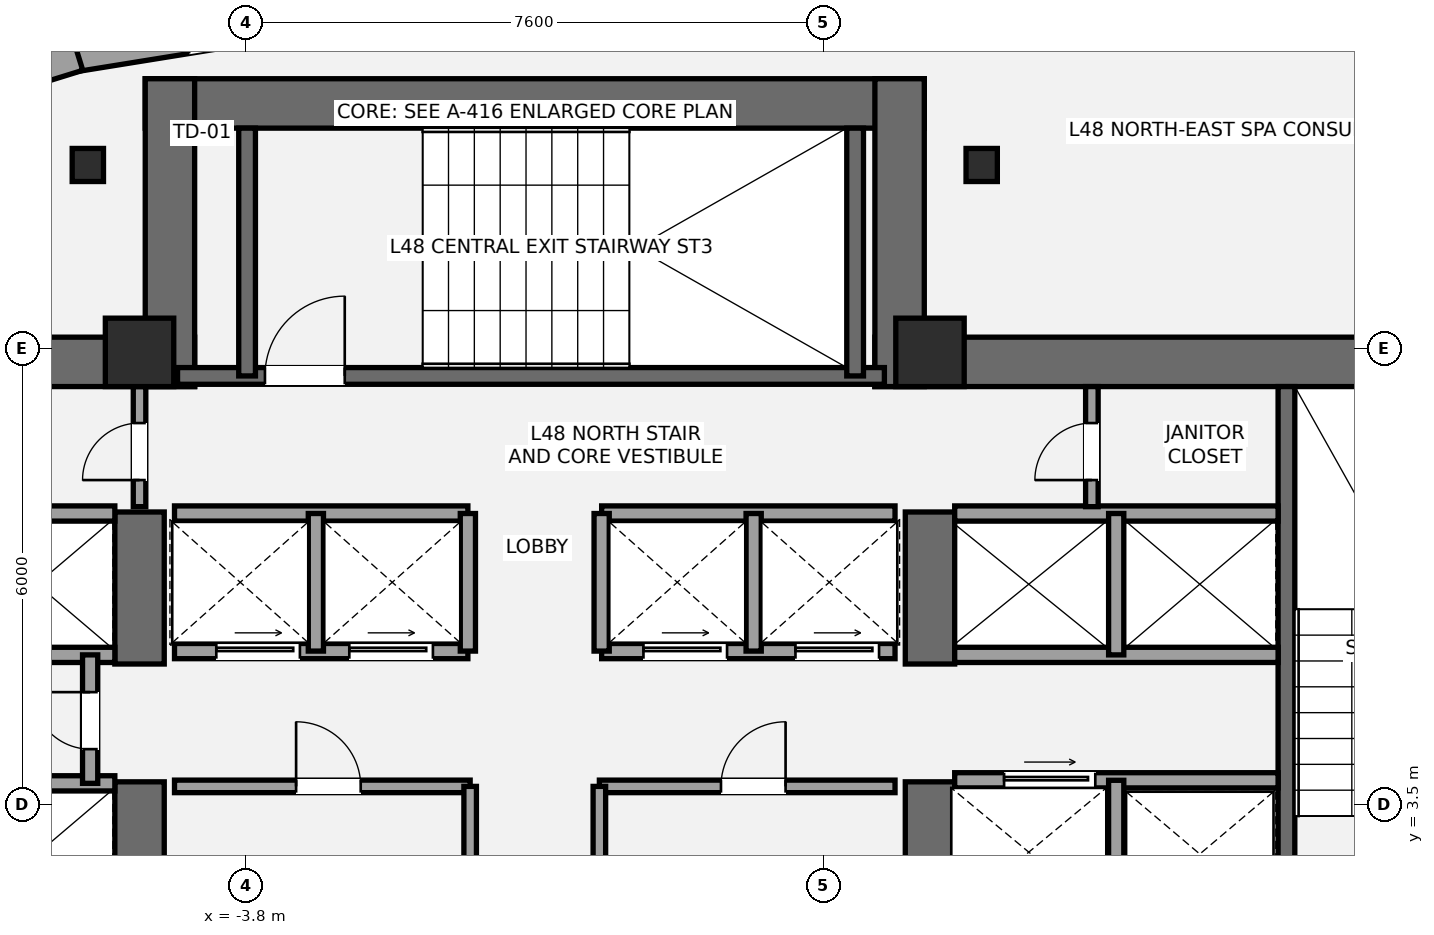
"""IFC4 building model, lengths in metres.
Left out: names, types, materials, properties, quantities, classifications, styles, units other than length and angle.
Written with IfcOpenShell. Run it as: python <this file> out.ifc"""

import sys

from ifc_helpers import new_model, si_unit, direction, frame, frame_2d, origin, origin_2d, place, context, subcontext, project, spatial, rectangle, i_section, extrude, element, fill, save


model = new_model("IFC4")
c1 = context("Model", 3, precision=1e-05, world=origin(), true_north=direction((0.0, 1.0)))
c2 = subcontext(c1, "Body", "Model", "MODEL_VIEW")
j1 = project(units=[si_unit("LENGTHUNIT", "METRE"), si_unit("PLANEANGLEUNIT", "RADIAN")], contexts=[c1])
p1 = place(None, origin())
s1 = spatial("IfcSite", under=j1, at=p1, CompositionType="ELEMENT")
p2 = place(p1, origin())
s2 = spatial("IfcBuilding", under=s1, at=p2, CompositionType="ELEMENT")
p3 = place(p2, frame((0.0, 0.0, 175.8)))
s3 = spatial("IfcBuildingStorey", under=s2, at=p3, CompositionType="ELEMENT", Elevation=175.8)
p4 = place(p3, frame((-13.8, 9.325, 0.0), z_axis=(0.0, 0.0, 1.0), x_axis=(1.0, 0.0, 0.0)))
e1 = element("IfcWall", 1, at=p4, inside=s3, PredefinedType="SHEAR", context=c2, shape_type="SweptSolid", body=[
    extrude(rectangle(XDim=9.325, YDim=0.65, at=frame_2d((4.663, 0.0))), origin(), (0.0, 0.0, 1.0), 3.2),
])
p5 = place(p3, frame((-5.2, 1.2, 0.0), z_axis=(0.0, 0.0, 1.0), x_axis=(0.0, 1.0, 0.0)))
e2 = element("IfcWall", 2, at=p5, inside=s3, PredefinedType="SHEAR", context=c2, shape_type="SweptSolid", body=[
    extrude(rectangle(XDim=2.6, YDim=0.65, at=frame_2d((1.3, 0.0))), origin(), (0.0, 0.0, 1.0), 3.2),
])
p6 = place(p3, frame((-5.2, 5.35, 0.0), z_axis=(0.0, 0.0, 1.0), x_axis=(0.0, 1.0, 0.0)))
e3 = element("IfcWall", 3, at=p6, inside=s3, PredefinedType="SHEAR", context=c2, shape_type="SweptSolid", body=[
    extrude(rectangle(XDim=2.0, YDim=0.65, at=frame_2d((1.0, 0.0))), origin(), (0.0, 0.0, 1.0), 3.2),
])
p7 = place(p3, frame((4.475, 9.325, 0.0), z_axis=(0.0, 0.0, 1.0), x_axis=(1.0, 0.0, 0.0)))
e4 = element("IfcWall", 4, at=p7, inside=s3, PredefinedType="SHEAR", context=c2, shape_type="SweptSolid", body=[
    extrude(rectangle(XDim=9.325, YDim=0.65, at=frame_2d((4.663, 0.0))), origin(), (0.0, 0.0, 1.0), 3.2),
])
p8 = place(p3, frame((5.2, 1.2, 0.0), z_axis=(0.0, 0.0, 1.0), x_axis=(0.0, 1.0, 0.0)))
e5 = element("IfcWall", 5, at=p8, inside=s3, PredefinedType="SHEAR", context=c2, shape_type="SweptSolid", body=[
    extrude(rectangle(XDim=2.6, YDim=0.65, at=frame_2d((1.3, 0.0))), origin(), (0.0, 0.0, 1.0), 3.2),
])
p9 = place(p3, frame((5.2, 5.35, 0.0), z_axis=(0.0, 0.0, 1.0), x_axis=(0.0, 1.0, 0.0)))
e6 = element("IfcWall", 6, at=p9, inside=s3, PredefinedType="SHEAR", context=c2, shape_type="SweptSolid", body=[
    extrude(rectangle(XDim=2.0, YDim=0.65, at=frame_2d((1.0, 0.0))), origin(), (0.0, 0.0, 1.0), 3.2),
])
p10 = place(p3, frame((9.89, 1.85, 0.0), z_axis=(0.0, 0.0, 1.0), x_axis=(0.0, 1.0, 0.0)))
e7 = element("IfcWall", 7, at=p10, inside=s3, PredefinedType="SHEAR", context=c2, shape_type="SweptSolid", body=[
    extrude(rectangle(XDim=7.15, YDim=0.22, at=frame_2d((3.575, 0.0))), origin(), (0.0, 0.0, 1.0), 3.2),
])
p11 = place(p3, frame((-5.125, 12.725, 0.0), z_axis=(0.0, 0.0, 1.0), x_axis=(1.0, 0.0, 0.0)))
e8 = element("IfcWall", 8, at=p11, inside=s3, PredefinedType="SHEAR", context=c2, shape_type="SweptSolid", body=[
    extrude(rectangle(XDim=10.25, YDim=0.65, at=frame_2d((5.125, 0.0))), origin(), (0.0, 0.0, 1.0), 3.2),
])
for number, where, z_axis, x_axis in (
    (9, (-4.8, 9.0, 0.0), (0.0, 0.0, 1.0), (0.0, 1.0, 0.0)),
    (10, (4.8, 9.0, 0.0), (0.0, 0.0, 1.0), (0.0, 1.0, 0.0)),
):
    element("IfcWall", number, at=place(p3, frame(where, z_axis=z_axis, x_axis=x_axis)), inside=s3, PredefinedType="SHEAR", context=c2, shape_type="SweptSolid", body=[
        extrude(rectangle(XDim=4.05, YDim=0.65, at=frame_2d((2.025, 0.0))), origin(), (0.0, 0.0, 1.0), 3.2),
    ])
p12 = place(p3, frame((-4.7, 9.14, 0.0), z_axis=(0.0, 0.0, 1.0), x_axis=(1.0, 0.0, 0.0)))
e11 = element("IfcWall", 11, at=p12, inside=s3, PredefinedType="SHEAR", context=c2, shape_type="SweptSolid", body=[
    extrude(rectangle(XDim=9.3, YDim=0.22, at=frame_2d((4.65, 0.0))), origin(), (0.0, 0.0, 1.0), 3.2),
])
p13 = place(p12, frame((1.15, 0.0, 0.0)))
e12 = element("IfcOpeningElement", 12, at=p13, cuts=e11, PredefinedType="OPENING", context=c2, shape_type="SweptSolid", body=[
    extrude(rectangle(XDim=1.05, YDim=2.15, at=frame_2d((0.525, 1.075))), frame((0.0, 0.12, 0.0), z_axis=(0.0, -1.0, 0.0), x_axis=(1.0, 0.0, 0.0)), (0.0, 0.0, 1.0), 0.24),
])
for number, where, z_axis, x_axis in (
    (13, (-3.785, 9.14, 0.0), (0.0, 0.0, 1.0), (0.0, 1.0, 0.0)),
    (14, (4.215, 9.14, 0.0), (0.0, 0.0, 1.0), (0.0, 1.0, 0.0)),
):
    element("IfcWall", number, at=place(p3, frame(where, z_axis=z_axis, x_axis=x_axis)), inside=s3, PredefinedType="SHEAR", context=c2, shape_type="SweptSolid", body=[
        extrude(rectangle(XDim=3.26, YDim=0.22, at=frame_2d((1.63, 0.0))), origin(), (0.0, 0.0, 1.0), 3.2),
    ])
for number, where, z_axis, x_axis in (
    (15, (-5.2, 9.45, 0.0), (0.0, 0.0, 1.0), (1.0, 0.0, 0.0)),
    (16, (5.2, 9.45, 0.0), (0.0, 0.0, 1.0), (1.0, 0.0, 0.0)),
):
    element("IfcColumn", number, at=place(p3, frame(where, z_axis=z_axis, x_axis=x_axis)), inside=s3, PredefinedType="COLUMN", context=c2, shape_type="SweptSolid", body=[
        extrude(rectangle(XDim=0.9, YDim=0.9, at=origin_2d()), origin(), (0.0, 0.0, 1.0), 3.2),
    ])
for number, where, z_axis, x_axis in (
    (17, (5.88, 11.915, 0.0), (0.0, 0.0, 1.0), (1.0, 0.0, 0.0)),
    (18, (-5.88, 11.915, 0.0), (0.0, 0.0, 1.0), (1.0, 0.0, 0.0)),
):
    element("IfcColumn", number, at=place(p3, frame(where, z_axis=z_axis, x_axis=x_axis)), inside=s3, PredefinedType="COLUMN", context=c2, shape_type="SweptSolid", body=[
        extrude(i_section(OverallWidth=0.412, OverallDepth=0.435, WebThickness=0.036, FlangeThickness=0.057, at=origin_2d()), origin(), (0.0, 0.0, 1.0), 3.2),
    ])
p14 = place(p3, frame((-6.042, 13.364, 0.0), z_axis=(0.0, 0.0, 1.0), x_axis=(0.987261838992, 0.159103932287, 0.0)))
e19 = element("IfcWall", 19, at=p14, inside=s3, PredefinedType="STANDARD", context=c2, shape_type="SweptSolid", body=[
    extrude(rectangle(XDim=4.062, YDim=0.44, at=frame_2d((2.031, 0.0))), origin(), (0.0, 0.0, 1.0), 2.319),
])
p15 = place(p14, frame((1.481, 0.0, 0.0)))
e20 = element("IfcOpeningElement", 20, at=p15, cuts=e19, PredefinedType="OPENING", context=c2, shape_type="SweptSolid", body=[
    extrude(rectangle(XDim=1.1, YDim=2.15, at=frame_2d((0.55, 1.075))), frame((0.0, 0.23, 0.0), z_axis=(0.0, -1.0, 0.0), x_axis=(1.0, 0.0, 0.0)), (0.0, 0.0, 1.0), 0.46),
])
p16 = place(p3, frame((-9.733, 12.216, 0.0), z_axis=(0.0, 0.0, 1.0), x_axis=(0.955075759072, 0.296361762772, 0.0)))
e21 = element("IfcWall", 21, at=p16, inside=s3, PredefinedType="STANDARD", context=c2, shape_type="SweptSolid", body=[
    extrude(rectangle(XDim=3.896, YDim=0.44, at=frame_2d((1.948, 0.0))), origin(), (0.0, 0.0, 1.0), 2.319),
])
p17 = place(p16, frame((1.148, 0.0, 0.58)))
e22 = element("IfcOpeningElement", 22, at=p17, cuts=e21, PredefinedType="OPENING", context=c2, shape_type="SweptSolid", body=[
    extrude(rectangle(XDim=1.6, YDim=1.55, at=frame_2d((0.8, 0.775))), frame((0.0, 0.23, 0.0), z_axis=(0.0, -1.0, 0.0), x_axis=(1.0, 0.0, 0.0)), (0.0, 0.0, 1.0), 0.46),
])
for number, where, z_axis, x_axis in (
    (23, (-9.78, 3.78, 0.0), (0.0, 0.0, 1.0), (1.0, 0.0, 0.0)),
    (24, (-9.78, 5.47, 0.0), (0.0, 0.0, 1.0), (1.0, 0.0, 0.0)),
    (25, (-9.78, 7.33, 0.0), (0.0, 0.0, 1.0), (1.0, 0.0, 0.0)),
):
    element("IfcWall", number, at=place(p3, frame(where, z_axis=z_axis, x_axis=x_axis)), inside=s3, PredefinedType="SOLIDWALL", context=c2, shape_type="SweptSolid", body=[
        extrude(rectangle(XDim=4.255, YDim=0.2, at=frame_2d((2.127, 0.0))), origin(), (0.0, 0.0, 1.0), 3.02),
    ])
p18 = place(p3, frame((-5.85, 3.78, 0.0), z_axis=(0.0, 0.0, 1.0), x_axis=(0.0, 1.0, 0.0)))
e26 = element("IfcWall", 26, at=p18, inside=s3, PredefinedType="SOLIDWALL", context=c2, shape_type="SweptSolid", body=[
    extrude(rectangle(XDim=1.69, YDim=0.2, at=frame_2d((0.845, 0.0))), origin(), (0.0, 0.0, 1.0), 3.02),
])
p19 = place(p18, frame((0.45, 0.0, 0.0)))
e27 = element("IfcOpeningElement", 27, at=p19, cuts=e26, PredefinedType="OPENING", context=c2, shape_type="SweptSolid", body=[
    extrude(rectangle(XDim=0.75, YDim=2.1, at=frame_2d((0.375, 1.05))), frame((0.0, 0.11, 0.0), z_axis=(0.0, -1.0, 0.0), x_axis=(1.0, 0.0, 0.0)), (0.0, 0.0, 1.0), 0.22),
])
p20 = place(p3, frame((5.525, 3.82, 0.0), z_axis=(0.0, 0.0, 1.0), x_axis=(1.0, 0.0, 0.0)))
e28 = element("IfcWall", 28, at=p20, inside=s3, PredefinedType="SOLIDWALL", context=c2, shape_type="SweptSolid", body=[
    extrude(rectangle(XDim=4.255, YDim=0.2, at=frame_2d((2.127, 0.0))), origin(), (0.0, 0.0, 1.0), 3.02),
])
p21 = place(p20, frame((0.65, 0.0, 0.0)))
e29 = element("IfcOpeningElement", 29, at=p21, cuts=e28, PredefinedType="OPENING", context=c2, shape_type="SweptSolid", body=[
    extrude(rectangle(XDim=1.2, YDim=2.2, at=frame_2d((0.6, 1.1))), frame((0.0, 0.11, 0.0), z_axis=(0.0, -1.0, 0.0), x_axis=(1.0, 0.0, 0.0)), (0.0, 0.0, 1.0), 0.22),
])
p22 = place(p3, frame((7.65, 1.85, 0.0), z_axis=(0.0, 0.0, 1.0), x_axis=(0.0, 1.0, 0.0)))
e30 = element("IfcWall", 30, at=p22, inside=s3, PredefinedType="SOLIDWALL", context=c2, shape_type="SweptSolid", body=[
    extrude(rectangle(XDim=1.97, YDim=0.2, at=frame_2d((0.985, 0.0))), origin(), (0.0, 0.0, 1.0), 3.02),
])
for number, where, z_axis, x_axis in (
    (31, (5.525, 5.47, 0.0), (0.0, 0.0, 1.0), (1.0, 0.0, 0.0)),
    (32, (5.525, 7.33, 0.0), (0.0, 0.0, 1.0), (1.0, 0.0, 0.0)),
):
    element("IfcWall", number, at=place(p3, frame(where, z_axis=z_axis, x_axis=x_axis)), inside=s3, PredefinedType="SOLIDWALL", context=c2, shape_type="SweptSolid", body=[
        extrude(rectangle(XDim=4.255, YDim=0.2, at=frame_2d((2.127, 0.0))), origin(), (0.0, 0.0, 1.0), 3.02),
    ])
p23 = place(p3, frame((7.65, 5.47, 0.0), z_axis=(0.0, 0.0, 1.0), x_axis=(0.0, 1.0, 0.0)))
e33 = element("IfcWall", 33, at=p23, inside=s3, PredefinedType="SOLIDWALL", context=c2, shape_type="SweptSolid", body=[
    extrude(rectangle(XDim=1.86, YDim=0.2, at=frame_2d((0.93, 0.0))), origin(), (0.0, 0.0, 1.0), 3.02),
])
p24 = place(p3, frame((-4.74, 3.74, 0.0), z_axis=(0.0, 0.0, 1.0), x_axis=(1.0, 0.0, 0.0)))
e34 = element("IfcWall", 34, at=p24, inside=s3, PredefinedType="PARTITIONING", context=c2, shape_type="SweptSolid", body=[
    extrude(rectangle(XDim=3.89, YDim=0.165, at=frame_2d((1.945, 0.0))), origin(), (0.0, 0.0, 1.0), 3.02),
])
p25 = place(p24, frame((1.6, 0.0, 0.0)))
e35 = element("IfcOpeningElement", 35, at=p25, cuts=e34, PredefinedType="OPENING", context=c2, shape_type="SweptSolid", body=[
    extrude(rectangle(XDim=0.85, YDim=2.1, at=frame_2d((0.425, 1.05))), frame((0.0, 0.093, 0.0), z_axis=(0.0, -1.0, 0.0), x_axis=(1.0, 0.0, 0.0)), (0.0, 0.0, 1.0), 0.185),
])
p26 = place(p3, frame((-0.85, 1.92, 0.0), z_axis=(0.0, 0.0, 1.0), x_axis=(0.0, 1.0, 0.0)))
e36 = element("IfcWall", 36, at=p26, inside=s3, PredefinedType="PARTITIONING", context=c2, shape_type="SweptSolid", body=[
    extrude(rectangle(XDim=1.82, YDim=0.165, at=frame_2d((0.91, 0.0))), origin(), (0.0, 0.0, 1.0), 3.02),
])
p27 = place(p3, frame((0.85, 3.74, 0.0), z_axis=(0.0, 0.0, 1.0), x_axis=(1.0, 0.0, 0.0)))
e37 = element("IfcWall", 37, at=p27, inside=s3, PredefinedType="PARTITIONING", context=c2, shape_type="SweptSolid", body=[
    extrude(rectangle(XDim=3.89, YDim=0.165, at=frame_2d((1.945, 0.0))), origin(), (0.0, 0.0, 1.0), 3.02),
])
p28 = place(p27, frame((1.6, 0.0, 0.0)))
e38 = element("IfcOpeningElement", 38, at=p28, cuts=e37, PredefinedType="OPENING", context=c2, shape_type="SweptSolid", body=[
    extrude(rectangle(XDim=0.85, YDim=2.1, at=frame_2d((0.425, 1.05))), frame((0.0, 0.093, 0.0), z_axis=(0.0, -1.0, 0.0), x_axis=(1.0, 0.0, 0.0)), (0.0, 0.0, 1.0), 0.185),
])
p29 = place(p3, frame((0.85, 1.92, 0.0), z_axis=(0.0, 0.0, 1.0), x_axis=(0.0, 1.0, 0.0)))
e39 = element("IfcWall", 39, at=p29, inside=s3, PredefinedType="PARTITIONING", context=c2, shape_type="SweptSolid", body=[
    extrude(rectangle(XDim=1.82, YDim=0.165, at=frame_2d((0.91, 0.0))), origin(), (0.0, 0.0, 1.0), 3.02),
])
p30 = place(p3, frame((-4.74, 5.52, 0.0), z_axis=(0.0, 0.0, 1.0), x_axis=(1.0, 0.0, 0.0)))
e40 = element("IfcWall", 40, at=p30, inside=s3, PredefinedType="SOLIDWALL", context=c2, shape_type="SweptSolid", body=[
    extrude(rectangle(XDim=3.86, YDim=0.2, at=frame_2d((1.93, 0.0))), origin(), (0.0, 0.0, 1.0), 3.02),
])
p31 = place(p30, frame((0.55, 0.0, 0.0)))
e41 = element("IfcOpeningElement", 41, at=p31, cuts=e40, PredefinedType="OPENING", context=c2, shape_type="SweptSolid", body=[
    extrude(rectangle(XDim=1.1, YDim=2.2, at=frame_2d((0.55, 1.1))), frame((0.0, 0.11, 0.0), z_axis=(0.0, -1.0, 0.0), x_axis=(1.0, 0.0, 0.0)), (0.0, 0.0, 1.0), 0.22),
])
p32 = place(p30, frame((2.3, 0.0, 0.0)))
e42 = element("IfcOpeningElement", 42, at=p32, cuts=e40, PredefinedType="OPENING", context=c2, shape_type="SweptSolid", body=[
    extrude(rectangle(XDim=1.1, YDim=2.2, at=frame_2d((0.55, 1.1))), frame((0.0, 0.11, 0.0), z_axis=(0.0, -1.0, 0.0), x_axis=(1.0, 0.0, 0.0)), (0.0, 0.0, 1.0), 0.22),
])
p33 = place(p3, frame((0.88, 5.52, 0.0), z_axis=(0.0, 0.0, 1.0), x_axis=(1.0, 0.0, 0.0)))
e43 = element("IfcWall", 43, at=p33, inside=s3, PredefinedType="SOLIDWALL", context=c2, shape_type="SweptSolid", body=[
    extrude(rectangle(XDim=3.86, YDim=0.2, at=frame_2d((1.93, 0.0))), origin(), (0.0, 0.0, 1.0), 3.02),
])
p34 = place(p33, frame((0.55, 0.0, 0.0)))
e44 = element("IfcOpeningElement", 44, at=p34, cuts=e43, PredefinedType="OPENING", context=c2, shape_type="SweptSolid", body=[
    extrude(rectangle(XDim=1.1, YDim=2.2, at=frame_2d((0.55, 1.1))), frame((0.0, 0.11, 0.0), z_axis=(0.0, -1.0, 0.0), x_axis=(1.0, 0.0, 0.0)), (0.0, 0.0, 1.0), 0.22),
])
p35 = place(p33, frame((2.55, 0.0, 0.0)))
e45 = element("IfcOpeningElement", 45, at=p35, cuts=e43, PredefinedType="OPENING", context=c2, shape_type="SweptSolid", body=[
    extrude(rectangle(XDim=1.1, YDim=2.2, at=frame_2d((0.55, 1.1))), frame((0.0, 0.11, 0.0), z_axis=(0.0, -1.0, 0.0), x_axis=(1.0, 0.0, 0.0)), (0.0, 0.0, 1.0), 0.22),
])
for number, where, z_axis, x_axis in (
    (46, (-4.74, 7.33, 0.0), (0.0, 0.0, 1.0), (1.0, 0.0, 0.0)),
    (47, (0.88, 7.33, 0.0), (0.0, 0.0, 1.0), (1.0, 0.0, 0.0)),
):
    element("IfcWall", number, at=place(p3, frame(where, z_axis=z_axis, x_axis=x_axis)), inside=s3, PredefinedType="SOLIDWALL", context=c2, shape_type="SweptSolid", body=[
        extrude(rectangle(XDim=3.86, YDim=0.2, at=frame_2d((1.93, 0.0))), origin(), (0.0, 0.0, 1.0), 3.02),
    ])
for number, where, z_axis, x_axis in (
    (48, (-2.88, 5.52, 0.0), (0.0, 0.0, 1.0), (0.0, 1.0, 0.0)),
    (49, (2.88, 5.52, 0.0), (0.0, 0.0, 1.0), (0.0, 1.0, 0.0)),
    (50, (-0.88, 5.52, 0.0), (0.0, 0.0, 1.0), (0.0, 1.0, 0.0)),
    (51, (0.88, 5.52, 0.0), (0.0, 0.0, 1.0), (0.0, 1.0, 0.0)),
):
    element("IfcWall", number, at=place(p3, frame(where, z_axis=z_axis, x_axis=x_axis)), inside=s3, PredefinedType="SOLIDWALL", context=c2, shape_type="SweptSolid", body=[
        extrude(rectangle(XDim=1.81, YDim=0.2, at=frame_2d((0.905, 0.0))), origin(), (0.0, 0.0, 1.0), 3.02),
    ])
p36 = place(p3, frame((-5.2, 7.42, 0.0), z_axis=(0.0, 0.0, 1.0), x_axis=(0.0, 1.0, 0.0)))
e52 = element("IfcWall", 52, at=p36, inside=s3, PredefinedType="PARTITIONING", context=c2, shape_type="SweptSolid", body=[
    extrude(rectangle(XDim=1.58, YDim=0.165, at=frame_2d((0.79, 0.0))), origin(), (0.0, 0.0, 1.0), 3.02),
])
p37 = place(p36, frame((0.35, 0.0, 0.0)))
e53 = element("IfcOpeningElement", 53, at=p37, cuts=e52, PredefinedType="OPENING", context=c2, shape_type="SweptSolid", body=[
    extrude(rectangle(XDim=0.75, YDim=2.1, at=frame_2d((0.375, 1.05))), frame((0.0, 0.093, 0.0), z_axis=(0.0, -1.0, 0.0), x_axis=(1.0, 0.0, 0.0)), (0.0, 0.0, 1.0), 0.185),
])
p38 = place(p3, frame((7.33, 7.42, 0.0), z_axis=(0.0, 0.0, 1.0), x_axis=(0.0, 1.0, 0.0)))
e54 = element("IfcWall", 54, at=p38, inside=s3, PredefinedType="PARTITIONING", context=c2, shape_type="SweptSolid", body=[
    extrude(rectangle(XDim=1.58, YDim=0.165, at=frame_2d((0.79, 0.0))), origin(), (0.0, 0.0, 1.0), 3.02),
])
p39 = place(p38, frame((0.35, 0.0, 0.0)))
e55 = element("IfcOpeningElement", 55, at=p39, cuts=e54, PredefinedType="OPENING", context=c2, shape_type="SweptSolid", body=[
    extrude(rectangle(XDim=0.75, YDim=2.1, at=frame_2d((0.375, 1.05))), frame((0.0, 0.093, 0.0), z_axis=(0.0, -1.0, 0.0), x_axis=(1.0, 0.0, 0.0)), (0.0, 0.0, 1.0), 0.185),
])
p40 = place(p13, origin())
e56 = element("IfcDoor", 56, at=p40, inside=s3, OperationType="SINGLE_SWING_RIGHT", PredefinedType="DOOR", context=c2, shape_type="SweptSolid", body=[
    extrude(rectangle(XDim=1.05, YDim=2.15, at=frame_2d((0.525, 1.075))), frame((0.0, 0.025, 0.0), z_axis=(0.0, -1.0, 0.0), x_axis=(1.0, 0.0, 0.0)), (0.0, 0.0, 1.0), 0.05),
])
fill(e12, e56)
p41 = place(p19, origin())
e57 = element("IfcDoor", 57, at=p41, inside=s3, OperationType="SINGLE_SWING_RIGHT", PredefinedType="DOOR", context=c2, shape_type="SweptSolid", body=[
    extrude(rectangle(XDim=0.75, YDim=2.1, at=frame_2d((0.375, 1.05))), frame((0.0, 0.025, 0.0), z_axis=(0.0, -1.0, 0.0), x_axis=(1.0, 0.0, 0.0)), (0.0, 0.0, 1.0), 0.05),
])
fill(e27, e57)
p42 = place(p21, origin())
e58 = element("IfcDoor", 58, at=p42, inside=s3, OperationType="SLIDING_TO_RIGHT", PredefinedType="DOOR", context=c2, shape_type="SweptSolid", body=[
    extrude(rectangle(XDim=1.2, YDim=2.2, at=frame_2d((0.6, 1.1))), frame((0.0, 0.025, 0.0), z_axis=(0.0, -1.0, 0.0), x_axis=(1.0, 0.0, 0.0)), (0.0, 0.0, 1.0), 0.05),
])
fill(e29, e58)
p43 = place(p25, origin())
e59 = element("IfcDoor", 59, at=p43, inside=s3, OperationType="SINGLE_SWING_LEFT", PredefinedType="DOOR", context=c2, shape_type="SweptSolid", body=[
    extrude(rectangle(XDim=0.85, YDim=2.1, at=frame_2d((0.425, 1.05))), frame((0.0, 0.025, 0.0), z_axis=(0.0, -1.0, 0.0), x_axis=(1.0, 0.0, 0.0)), (0.0, 0.0, 1.0), 0.05),
])
fill(e35, e59)
p44 = place(p28, origin())
e60 = element("IfcDoor", 60, at=p44, inside=s3, OperationType="SINGLE_SWING_RIGHT", PredefinedType="DOOR", context=c2, shape_type="SweptSolid", body=[
    extrude(rectangle(XDim=0.85, YDim=2.1, at=frame_2d((0.425, 1.05))), frame((0.0, 0.025, 0.0), z_axis=(0.0, -1.0, 0.0), x_axis=(1.0, 0.0, 0.0)), (0.0, 0.0, 1.0), 0.05),
])
fill(e38, e60)
p45 = place(p31, origin())
e61 = element("IfcDoor", 61, at=p45, inside=s3, OperationType="SLIDING_TO_LEFT", PredefinedType="DOOR", context=c2, shape_type="SweptSolid", body=[
    extrude(rectangle(XDim=1.1, YDim=2.2, at=frame_2d((0.55, 1.1))), frame((0.0, 0.025, 0.0), z_axis=(0.0, -1.0, 0.0), x_axis=(1.0, 0.0, 0.0)), (0.0, 0.0, 1.0), 0.05),
])
fill(e41, e61)
p46 = place(p32, origin())
e62 = element("IfcDoor", 62, at=p46, inside=s3, OperationType="SLIDING_TO_LEFT", PredefinedType="DOOR", context=c2, shape_type="SweptSolid", body=[
    extrude(rectangle(XDim=1.1, YDim=2.2, at=frame_2d((0.55, 1.1))), frame((0.0, 0.025, 0.0), z_axis=(0.0, -1.0, 0.0), x_axis=(1.0, 0.0, 0.0)), (0.0, 0.0, 1.0), 0.05),
])
fill(e42, e62)
p47 = place(p34, origin())
e63 = element("IfcDoor", 63, at=p47, inside=s3, OperationType="SLIDING_TO_LEFT", PredefinedType="DOOR", context=c2, shape_type="SweptSolid", body=[
    extrude(rectangle(XDim=1.1, YDim=2.2, at=frame_2d((0.55, 1.1))), frame((0.0, 0.025, 0.0), z_axis=(0.0, -1.0, 0.0), x_axis=(1.0, 0.0, 0.0)), (0.0, 0.0, 1.0), 0.05),
])
fill(e44, e63)
p48 = place(p35, origin())
e64 = element("IfcDoor", 64, at=p48, inside=s3, OperationType="SLIDING_TO_LEFT", PredefinedType="DOOR", context=c2, shape_type="SweptSolid", body=[
    extrude(rectangle(XDim=1.1, YDim=2.2, at=frame_2d((0.55, 1.1))), frame((0.0, 0.025, 0.0), z_axis=(0.0, -1.0, 0.0), x_axis=(1.0, 0.0, 0.0)), (0.0, 0.0, 1.0), 0.05),
])
fill(e45, e64)
p49 = place(p37, origin())
e65 = element("IfcDoor", 65, at=p49, inside=s3, OperationType="SINGLE_SWING_LEFT", PredefinedType="DOOR", context=c2, shape_type="SweptSolid", body=[
    extrude(rectangle(XDim=0.75, YDim=2.1, at=frame_2d((0.375, 1.05))), frame((0.0, 0.025, 0.0), z_axis=(0.0, -1.0, 0.0), x_axis=(1.0, 0.0, 0.0)), (0.0, 0.0, 1.0), 0.05),
])
fill(e53, e65)
p50 = place(p39, origin())
e66 = element("IfcDoor", 66, at=p50, inside=s3, OperationType="SINGLE_SWING_LEFT", PredefinedType="DOOR", context=c2, shape_type="SweptSolid", body=[
    extrude(rectangle(XDim=0.75, YDim=2.1, at=frame_2d((0.375, 1.05))), frame((0.0, 0.025, 0.0), z_axis=(0.0, -1.0, 0.0), x_axis=(1.0, 0.0, 0.0)), (0.0, 0.0, 1.0), 0.05),
])
fill(e55, e66)
save(model, sys.argv[1])
